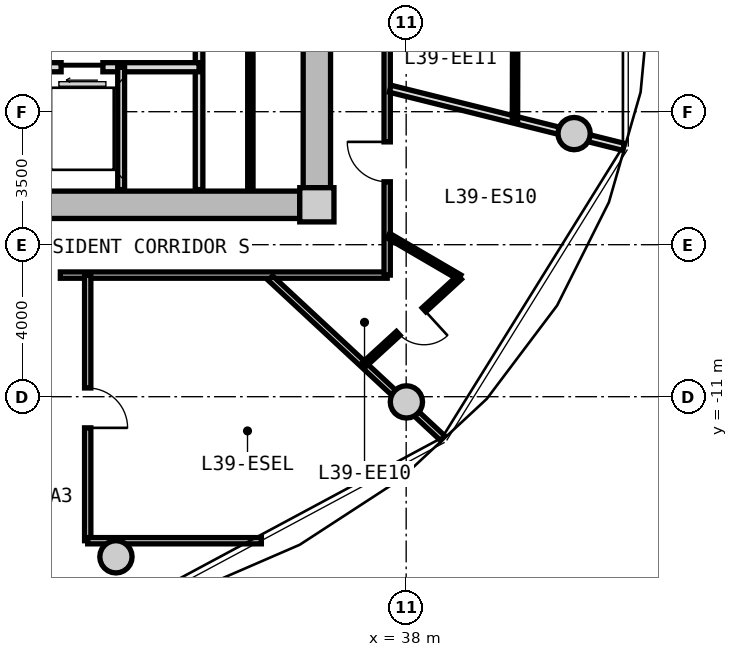
"""IFC4 building model, lengths in metres.
Left out: names, types, materials, properties, quantities, classifications, styles, units other than length and angle.
Written with IfcOpenShell. Run it as: python <this file> out.ifc"""

import sys

from ifc_helpers import new_model, si_unit, direction, frame, frame_2d, origin, origin_2d, place, context, subcontext, project, spatial, rectangle, circle, extrude, source, transform, mapped, element, fill, save


model = new_model("IFC4")
c1 = context("Model", 3, precision=1e-05, world=origin(), true_north=direction((0.0, 1.0)))
c2 = subcontext(c1, "Body", "Model", "MODEL_VIEW")
j1 = project(units=[si_unit("LENGTHUNIT", "METRE"), si_unit("PLANEANGLEUNIT", "RADIAN")], contexts=[c1])
p1 = place(None, origin())
s1 = spatial("IfcSite", under=j1, at=p1, CompositionType="ELEMENT")
p2 = place(p1, origin())
s2 = spatial("IfcBuilding", under=s1, at=p2, CompositionType="ELEMENT")
p3 = place(p2, frame((0.0, 0.0, 126.75)))
s3 = spatial("IfcBuildingStorey", under=s2, at=p3, CompositionType="ELEMENT", Elevation=126.75)
m1 = source(origin(), c2, "Body", "SweptSolid", [
    extrude(rectangle(XDim=0.9, YDim=0.9, at=origin_2d()), origin(), (0.0, 0.0, 1.0), 3.05),
])
p4 = place(p3, frame((35.65, -5.95, 0.0), z_axis=(0.0, 0.0, 1.0), x_axis=(1.0, 0.0, 0.0)))
e1 = element("IfcColumn", 1, at=p4, inside=s3, PredefinedType="COLUMN", context=c2, shape_type="MappedRepresentation", body=[
    mapped(m1, transform((0.0, 0.0, 0.0), x_axis=(1.0, 0.0, 0.0), y_axis=(0.0, 1.0, 0.0), z_axis=(0.0, 0.0, 1.0), scale=1.0)),
])
m2 = source(origin(), c2, "Body", "SweptSolid", [
    extrude(rectangle(XDim=14.4, YDim=0.72, at=frame_2d((7.2, 0.0))), origin(), (0.0, 0.0, 1.0), 2.73),
])
p5 = place(p3, frame((35.2, -5.95, 0.0), z_axis=(0.0, 0.0, 1.0), x_axis=(-1.0, 0.0, 0.0)))
e2 = element("IfcWall", 2, at=p5, inside=s3, PredefinedType="SHEAR", context=c2, shape_type="MappedRepresentation", body=[
    mapped(m2, transform((0.0, 0.0, 0.0), x_axis=(1.0, 0.0, 0.0), y_axis=(0.0, 1.0, 0.0), z_axis=(0.0, 0.0, 1.0), scale=1.0)),
])
m3 = source(origin(), c2, "Body", "SweptSolid", [
    extrude(rectangle(XDim=11.0, YDim=0.72, at=frame_2d((5.5, 0.0))), origin(), (0.0, 0.0, 1.0), 2.73),
])
p6 = place(p3, frame((35.65, 5.5, 0.0), z_axis=(0.0, 0.0, 1.0), x_axis=(0.0, -1.0, 0.0)))
e3 = element("IfcWall", 3, at=p6, inside=s3, PredefinedType="SHEAR", context=c2, shape_type="MappedRepresentation", body=[
    mapped(m3, transform((0.0, 0.0, 0.0), x_axis=(1.0, 0.0, 0.0), y_axis=(0.0, 1.0, 0.0), z_axis=(0.0, 0.0, 1.0), scale=1.0)),
])
p7 = place(p6, frame((5.65, 0.0, 0.0)))
e4 = element("IfcOpeningElement", 4, at=p7, cuts=e3, PredefinedType="OPENING", context=c2, shape_type="SweptSolid", body=[
    extrude(rectangle(XDim=1.2, YDim=2.15, at=frame_2d((0.6, 1.075))), frame((0.0, 0.37, 0.0), z_axis=(0.0, -1.0, 0.0), x_axis=(1.0, 0.0, 0.0)), (0.0, 0.0, 1.0), 0.74),
])
m4 = source(origin(), c2, "Body", "SweptSolid", [
    extrude(circle(Radius=0.425, at=origin_2d()), origin(), (0.0, 0.0, 1.0), 3.05),
])
for number, where, z_axis, x_axis in (
    (5, (30.363, -15.213, 0.0), (0.0, 0.0, 1.0), (1.0, 0.0, 0.0)),
    (6, (38.006, -11.137, 0.0), (0.0, 0.0, 1.0), (1.0, 0.0, 0.0)),
    (7, (42.419, -4.076, 0.0), (0.0, 0.0, 1.0), (1.0, 0.0, 0.0)),
):
    element("IfcColumn", number, at=place(p3, frame(where, z_axis=z_axis, x_axis=x_axis)), inside=s3, PredefinedType="COLUMN", context=c2, shape_type="MappedRepresentation", body=[
        mapped(m4, transform((0.0, 0.0, 0.0), x_axis=(1.0, 0.0, 0.0), y_axis=(0.0, 1.0, 0.0), z_axis=(0.0, 0.0, 1.0), scale=1.0)),
    ])
m5 = source(origin(), c2, "Body", "SweptSolid", [
    extrude(rectangle(XDim=3.8, YDim=0.2, at=frame_2d((1.9, 0.0))), origin(), (0.0, 0.0, 1.0), 2.715),
])
p8 = place(p3, frame((32.55, -5.55, 0.0), z_axis=(0.0, 0.0, 1.0), x_axis=(0.0, 1.0, 0.0)))
e8 = element("IfcWall", 8, at=p8, inside=s3, PredefinedType="PARTITIONING", context=c2, shape_type="MappedRepresentation", body=[
    mapped(m5, transform((0.0, 0.0, 0.0), x_axis=(1.0, 0.0, 0.0), y_axis=(0.0, 1.0, 0.0), z_axis=(0.0, 0.0, 1.0), scale=1.0)),
])
m6 = source(origin(), c2, "Body", "SweptSolid", [
    extrude(rectangle(XDim=4.13, YDim=0.24, at=frame_2d((2.065, 0.0))), origin(), (0.0, 0.0, 1.0), 2.715),
])
p9 = place(p3, frame((28.42, -2.33, 0.0), z_axis=(0.0, 0.0, 1.0), x_axis=(1.0, 0.0, 0.0)))
e9 = element("IfcWall", 9, at=p9, inside=s3, PredefinedType="PARTITIONING", context=c2, shape_type="MappedRepresentation", body=[
    mapped(m6, transform((0.0, 0.0, 0.0), x_axis=(1.0, 0.0, 0.0), y_axis=(0.0, 1.0, 0.0), z_axis=(0.0, 0.0, 1.0), scale=1.0)),
])
p10 = place(p9, frame((0.5, 0.0, 0.0)))
e10 = element("IfcOpeningElement", 10, at=p10, cuts=e9, PredefinedType="OPENING", context=c2, shape_type="SweptSolid", body=[
    extrude(rectangle(XDim=1.1, YDim=2.2, at=frame_2d((0.55, 1.1))), frame((0.0, 0.13, 0.0), z_axis=(0.0, -1.0, 0.0), x_axis=(1.0, 0.0, 0.0)), (0.0, 0.0, 1.0), 0.26),
])
m7 = source(origin(), c2, "Body", "SweptSolid", [
    extrude(rectangle(XDim=3.22, YDim=0.18, at=frame_2d((1.61, 0.0))), origin(), (0.0, 0.0, 1.0), 2.715),
])
p11 = place(p3, frame((30.5, -5.55, 0.0), z_axis=(0.0, 0.0, 1.0), x_axis=(0.0, 1.0, 0.0)))
e11 = element("IfcWall", 11, at=p11, inside=s3, PredefinedType="PARTITIONING", context=c2, shape_type="MappedRepresentation", body=[
    mapped(m7, transform((0.0, 0.0, 0.0), x_axis=(1.0, 0.0, 0.0), y_axis=(0.0, 1.0, 0.0), z_axis=(0.0, 0.0, 1.0), scale=1.0)),
])
m8 = source(origin(), c2, "Body", "SweptSolid", [
    extrude(rectangle(XDim=3.8, YDim=0.14, at=frame_2d((1.9, 0.0))), origin(), (0.0, 0.0, 1.0), 2.715),
])
p12 = place(p3, frame((33.9, -5.55, 0.0), z_axis=(0.0, 0.0, 1.0), x_axis=(0.0, 1.0, 0.0)))
e12 = element("IfcWall", 12, at=p12, inside=s3, PredefinedType="PARTITIONING", context=c2, shape_type="MappedRepresentation", body=[
    mapped(m8, transform((0.0, 0.0, 0.0), x_axis=(1.0, 0.0, 0.0), y_axis=(0.0, 1.0, 0.0), z_axis=(0.0, 0.0, 1.0), scale=1.0)),
])
m9 = source(origin(), c2, "Body", "SweptSolid", [
    extrude(rectangle(XDim=8.6, YDim=0.165, at=frame_2d((4.3, 0.0))), origin(), (0.0, 0.0, 1.0), 2.715),
])
p13 = place(p3, frame((37.5, -7.8, 0.0), z_axis=(0.0, 0.0, 1.0), x_axis=(-1.0, 0.0, 0.0)))
e13 = element("IfcWall", 13, at=p13, inside=s3, PredefinedType="PARTITIONING", context=c2, shape_type="MappedRepresentation", body=[
    mapped(m9, transform((0.0, 0.0, 0.0), x_axis=(1.0, 0.0, 0.0), y_axis=(0.0, 1.0, 0.0), z_axis=(0.0, 0.0, 1.0), scale=1.0)),
])
m10 = source(origin(), c2, "Body", "SweptSolid", [
    extrude(rectangle(XDim=15.6, YDim=0.165, at=frame_2d((7.8, 0.0))), origin(), (0.0, 0.0, 1.0), 2.715),
])
p14 = place(p3, frame((37.5, 7.8, 0.0), z_axis=(0.0, 0.0, 1.0), x_axis=(0.0, -1.0, 0.0)))
e14 = element("IfcWall", 14, at=p14, inside=s3, PredefinedType="PARTITIONING", context=c2, shape_type="MappedRepresentation", body=[
    mapped(m10, transform((0.0, 0.0, 0.0), x_axis=(1.0, 0.0, 0.0), y_axis=(0.0, 1.0, 0.0), z_axis=(0.0, 0.0, 1.0), scale=1.0)),
])
p15 = place(p14, frame((12.094, 0.0, 0.0)))
e15 = element("IfcOpeningElement", 15, at=p15, cuts=e14, PredefinedType="OPENING", context=c2, shape_type="SweptSolid", body=[
    extrude(rectangle(XDim=1.05, YDim=2.15, at=frame_2d((0.525, 1.075))), frame((0.0, 0.093, 0.0), z_axis=(0.0, -1.0, 0.0), x_axis=(1.0, 0.0, 0.0)), (0.0, 0.0, 1.0), 0.185),
])
p16 = place(p14, frame((5.971, 0.0, 0.0)))
e16 = element("IfcOpeningElement", 16, at=p16, cuts=e14, PredefinedType="OPENING", context=c2, shape_type="SweptSolid", body=[
    extrude(rectangle(XDim=1.05, YDim=2.15, at=frame_2d((0.525, 1.075))), frame((0.0, 0.093, 0.0), z_axis=(0.0, -1.0, 0.0), x_axis=(1.0, 0.0, 0.0)), (0.0, 0.0, 1.0), 0.185),
])
p17 = place(p14, frame((3.324, 0.0, 0.0)))
e17 = element("IfcOpeningElement", 17, at=p17, cuts=e14, PredefinedType="OPENING", context=c2, shape_type="SweptSolid", body=[
    extrude(rectangle(XDim=0.92, YDim=2.1, at=frame_2d((0.46, 1.05))), frame((0.0, 0.093, 0.0), z_axis=(0.0, -1.0, 0.0), x_axis=(1.0, 0.0, 0.0)), (0.0, 0.0, 1.0), 0.185),
])
m11 = source(origin(), c2, "Body", "SweptSolid", [
    extrude(rectangle(XDim=6.187, YDim=0.165, at=frame_2d((3.093, 0.0))), origin(), (0.0, 0.0, 1.0), 2.215),
])
p18 = place(p3, frame((34.429, -7.88, 0.0), z_axis=(0.0, 0.0, 1.0), x_axis=(0.732501077882, -0.680765870841, 0.0)))
e18 = element("IfcWall", 18, at=p18, inside=s3, PredefinedType="PARTITIONING", context=c2, shape_type="MappedRepresentation", body=[
    mapped(m11, transform((0.0, 0.0, 0.0), x_axis=(1.0, 0.0, 0.0), y_axis=(0.0, 1.0, 0.0), z_axis=(0.0, 0.0, 1.0), scale=1.0)),
])
m12 = source(origin(), c2, "Body", "SweptSolid", [
    extrude(rectangle(XDim=6.99, YDim=0.165, at=frame_2d((3.495, 0.0))), origin(), (0.0, 0.0, 1.0), 2.215),
])
p19 = place(p3, frame((29.62, -14.79, 0.0), z_axis=(0.0, 0.0, 1.0), x_axis=(0.0, 1.0, 0.0)))
e19 = element("IfcWall", 19, at=p19, inside=s3, PredefinedType="PARTITIONING", context=c2, shape_type="MappedRepresentation", body=[
    mapped(m12, transform((0.0, 0.0, 0.0), x_axis=(1.0, 0.0, 0.0), y_axis=(0.0, 1.0, 0.0), z_axis=(0.0, 0.0, 1.0), scale=1.0)),
])
p20 = place(p19, frame((2.97, 0.0, 0.0)))
e20 = element("IfcOpeningElement", 20, at=p20, cuts=e19, PredefinedType="OPENING", context=c2, shape_type="SweptSolid", body=[
    extrude(rectangle(XDim=1.05, YDim=2.15, at=frame_2d((0.525, 1.075))), frame((0.0, 0.093, 0.0), z_axis=(0.0, -1.0, 0.0), x_axis=(1.0, 0.0, 0.0)), (0.0, 0.0, 1.0), 0.185),
])
m13 = source(origin(), c2, "Body", "SweptSolid", [
    extrude(rectangle(XDim=4.569, YDim=0.165, at=frame_2d((2.285, 0.0))), origin(), (0.0, 0.0, 1.0), 2.715),
])
p21 = place(p3, frame((29.62, -14.79, 0.0), z_axis=(0.0, 0.0, 1.0), x_axis=(1.0, 0.0, 0.0)))
e21 = element("IfcWall", 21, at=p21, inside=s3, PredefinedType="PARTITIONING", context=c2, shape_type="MappedRepresentation", body=[
    mapped(m13, transform((0.0, 0.0, 0.0), x_axis=(1.0, 0.0, 0.0), y_axis=(0.0, 1.0, 0.0), z_axis=(0.0, 0.0, 1.0), scale=1.0)),
])
m14 = source(origin(), c2, "Body", "SweptSolid", [
    extrude(rectangle(XDim=6.331, YDim=0.19, at=frame_2d((3.165, 0.0))), origin(), (0.0, 0.0, 1.0), 2.215),
])
p22 = place(p3, frame((37.58, -2.896, 0.0), z_axis=(0.0, 0.0, 1.0), x_axis=(0.97036440661, -0.241646267062, 0.0)))
e22 = element("IfcWall", 22, at=p22, inside=s3, PredefinedType="PARTITIONING", context=c2, shape_type="MappedRepresentation", body=[
    mapped(m14, transform((0.0, 0.0, 0.0), x_axis=(1.0, 0.0, 0.0), y_axis=(0.0, 1.0, 0.0), z_axis=(0.0, 0.0, 1.0), scale=1.0)),
])
m15 = source(origin(), c2, "Body", "SweptSolid", [
    extrude(rectangle(XDim=2.172, YDim=0.14, at=frame_2d((1.086, 0.0))), origin(), (0.0, 0.0, 1.0), 2.715),
])
p23 = place(p3, frame((37.53, -6.762, 0.0), z_axis=(0.0, 0.0, 1.0), x_axis=(0.863562702562, -0.504241468688, 0.0)))
e23 = element("IfcWall", 23, at=p23, inside=s3, PredefinedType="PARTITIONING", context=c2, shape_type="MappedRepresentation", body=[
    mapped(m15, transform((0.0, 0.0, 0.0), x_axis=(1.0, 0.0, 0.0), y_axis=(0.0, 1.0, 0.0), z_axis=(0.0, 0.0, 1.0), scale=1.0)),
])
m16 = source(origin(), c2, "Body", "SweptSolid", [
    extrude(rectangle(XDim=3.457, YDim=0.14, at=frame_2d((1.729, 0.0))), origin(), (0.0, 0.0, 1.0), 2.715),
])
p24 = place(p3, frame((39.405, -7.857, 0.0), z_axis=(0.0, 0.0, 1.0), x_axis=(-0.737567375492, -0.675273549467, 0.0)))
e24 = element("IfcWall", 24, at=p24, inside=s3, PredefinedType="PARTITIONING", context=c2, shape_type="MappedRepresentation", body=[
    mapped(m16, transform((0.0, 0.0, 0.0), x_axis=(1.0, 0.0, 0.0), y_axis=(0.0, 1.0, 0.0), z_axis=(0.0, 0.0, 1.0), scale=1.0)),
])
p25 = place(p24, frame((1.268, 0.0, 0.0)))
e25 = element("IfcOpeningElement", 25, at=p25, cuts=e24, PredefinedType="OPENING", context=c2, shape_type="SweptSolid", body=[
    extrude(rectangle(XDim=0.92, YDim=2.1, at=frame_2d((0.46, 1.05))), frame((0.0, 0.08, 0.0), z_axis=(0.0, -1.0, 0.0), x_axis=(1.0, 0.0, 0.0)), (0.0, 0.0, 1.0), 0.16),
])
m17 = source(origin(), c2, "Body", "SweptSolid", [
    extrude(rectangle(XDim=3.247, YDim=0.14, at=frame_2d((1.624, 0.0))), origin(), (0.0, 0.0, 1.0), 2.715),
])
p26 = place(p3, frame((40.87, -0.487, 0.0), z_axis=(0.0, 0.0, 1.0), x_axis=(-0.002105100215, -0.999997784274, 0.0)))
e26 = element("IfcWall", 26, at=p26, inside=s3, PredefinedType="PARTITIONING", context=c2, shape_type="MappedRepresentation", body=[
    mapped(m17, transform((0.0, 0.0, 0.0), x_axis=(1.0, 0.0, 0.0), y_axis=(0.0, 1.0, 0.0), z_axis=(0.0, 0.0, 1.0), scale=1.0)),
])
m18 = source(origin(), c2, "Body", "SweptSolid", [
    extrude(rectangle(XDim=1.1, YDim=2.2, at=frame_2d((0.55, 1.1))), frame((0.0, 0.025, 0.0), z_axis=(0.0, -1.0, 0.0), x_axis=(1.0, 0.0, 0.0)), (0.0, 0.0, 1.0), 0.05),
])
p27 = place(p10, frame((1.1, 0.0, 0.0), z_axis=(0.0, 0.0, 1.0), x_axis=(-1.0, 0.0, 0.0)))
e27 = element("IfcDoor", 27, at=p27, inside=s3, OperationType="SLIDING_TO_LEFT", PredefinedType="DOOR", context=c2, shape_type="MappedRepresentation", body=[
    mapped(m18, transform((0.0, 0.0, 0.0), x_axis=(1.0, 0.0, 0.0), y_axis=(0.0, 1.0, 0.0), z_axis=(0.0, 0.0, 1.0), scale=1.0)),
])
fill(e10, e27)
m19 = source(origin(), c2, "Body", "SweptSolid", [
    extrude(rectangle(XDim=1.05, YDim=2.15, at=frame_2d((0.525, 1.075))), frame((0.0, 0.025, 0.0), z_axis=(0.0, -1.0, 0.0), x_axis=(1.0, 0.0, 0.0)), (0.0, 0.0, 1.0), 0.05),
])
p28 = place(p20, frame((1.05, 0.0, 0.0), z_axis=(0.0, 0.0, 1.0), x_axis=(-1.0, 0.0, 0.0)))
e28 = element("IfcDoor", 28, at=p28, inside=s3, OperationType="SINGLE_SWING_RIGHT", PredefinedType="DOOR", context=c2, shape_type="MappedRepresentation", body=[
    mapped(m19, transform((0.0, 0.0, 0.0), x_axis=(1.0, 0.0, 0.0), y_axis=(0.0, 1.0, 0.0), z_axis=(0.0, 0.0, 1.0), scale=1.0)),
])
fill(e20, e28)
p29 = place(p15, frame((1.05, 0.0, 0.0), z_axis=(0.0, 0.0, 1.0), x_axis=(-1.0, 0.0, 0.0)))
e29 = element("IfcDoor", 29, at=p29, inside=s3, OperationType="SINGLE_SWING_RIGHT", PredefinedType="DOOR", context=c2, shape_type="MappedRepresentation", body=[
    mapped(m19, transform((0.0, 0.0, 0.0), x_axis=(1.0, 0.0, 0.0), y_axis=(0.0, 1.0, 0.0), z_axis=(0.0, 0.0, 1.0), scale=1.0)),
])
fill(e15, e29)
m20 = source(origin(), c2, "Body", "SweptSolid", [
    extrude(rectangle(XDim=0.92, YDim=2.1, at=frame_2d((0.46, 1.05))), frame((0.0, 0.025, 0.0), z_axis=(0.0, -1.0, 0.0), x_axis=(1.0, 0.0, 0.0)), (0.0, 0.0, 1.0), 0.05),
])
p30 = place(p25, origin())
e30 = element("IfcDoor", 30, at=p30, inside=s3, OperationType="SINGLE_SWING_LEFT", PredefinedType="DOOR", context=c2, shape_type="MappedRepresentation", body=[
    mapped(m20, transform((0.0, 0.0, 0.0), x_axis=(1.0, 0.0, 0.0), y_axis=(0.0, 1.0, 0.0), z_axis=(0.0, 0.0, 1.0), scale=1.0)),
])
fill(e25, e30)
save(model, sys.argv[1])
